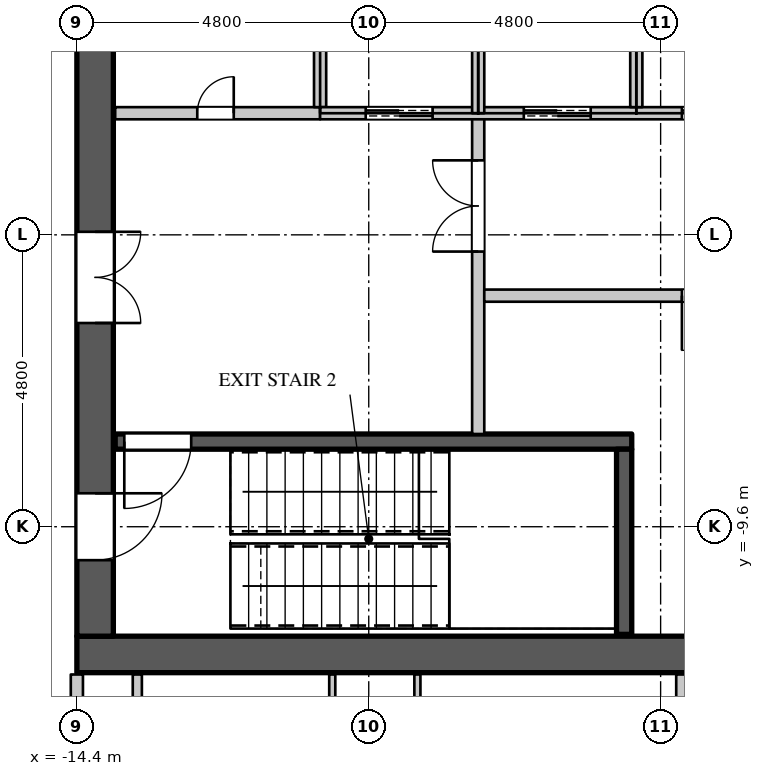
"""IFC4 building model, lengths in metres.
Left out: names, types, materials, properties, quantities, classifications, styles, units other than length and angle.
Written with IfcOpenShell. Run it as: python <this file> out.ifc"""

import sys

from ifc_helpers import new_model, si_unit, direction, frame, frame_2d, origin, place, context, subcontext, project, spatial, rectangle, extrude, element, fill, save


model = new_model("IFC4")
c1 = context("Model", 3, precision=1e-05, world=origin(), true_north=direction((0.0, 1.0)))
c2 = subcontext(c1, "Body", "Model", "MODEL_VIEW")
j1 = project(units=[si_unit("LENGTHUNIT", "METRE"), si_unit("PLANEANGLEUNIT", "RADIAN")], contexts=[c1])
p1 = place(None, origin())
s1 = spatial("IfcSite", under=j1, at=p1, CompositionType="ELEMENT")
p2 = place(p1, origin())
s2 = spatial("IfcBuilding", under=s1, at=p2, CompositionType="ELEMENT")
p3 = place(p2, frame((0.0, 0.0, 281.1)))
s3 = spatial("IfcBuildingStorey", under=s2, at=p3, CompositionType="ELEMENT", Elevation=281.1)
p4 = place(p3, frame((-14.4, -11.7, 0.0), z_axis=(0.0, 0.0, 1.0), x_axis=(1.0, 0.0, 0.0)))
e1 = element("IfcWall", 1, at=p4, inside=s3, PredefinedType="SHEAR", context=c2, shape_type="SweptSolid", body=[
    extrude(rectangle(XDim=28.8, YDim=0.6, at=frame_2d((14.4, 0.0))), origin(), (0.0, 0.0, 1.0), 4.2),
])
p5 = place(p3, frame((-14.1, -11.4, 0.0), z_axis=(0.0, 0.0, 1.0), x_axis=(0.0, 1.0, 0.0)))
e2 = element("IfcWall", 2, at=p5, inside=s3, PredefinedType="SHEAR", context=c2, shape_type="SweptSolid", body=[
    extrude(rectangle(XDim=22.8, YDim=0.6, at=frame_2d((11.4, 0.0))), origin(), (0.0, 0.0, 1.0), 4.2),
])
p6 = place(p5, frame((20.45, 0.0, 0.0)))
e3 = element("IfcOpeningElement", 3, at=p6, cuts=e2, PredefinedType="OPENING", context=c2, shape_type="SweptSolid", body=[
    extrude(rectangle(XDim=1.1, YDim=2.2, at=frame_2d((0.55, 1.1))), frame((0.0, 0.31, 0.0), z_axis=(0.0, -1.0, 0.0), x_axis=(1.0, 0.0, 0.0)), (0.0, 0.0, 1.0), 0.62),
])
p7 = place(p5, frame((1.25, 0.0, 0.0)))
e4 = element("IfcOpeningElement", 4, at=p7, cuts=e2, PredefinedType="OPENING", context=c2, shape_type="SweptSolid", body=[
    extrude(rectangle(XDim=1.1, YDim=2.2, at=frame_2d((0.55, 1.1))), frame((0.0, 0.31, 0.0), z_axis=(0.0, -1.0, 0.0), x_axis=(1.0, 0.0, 0.0)), (0.0, 0.0, 1.0), 0.62),
])
p8 = place(p5, frame((16.15, 0.0, 0.0)))
e5 = element("IfcOpeningElement", 5, at=p8, cuts=e2, PredefinedType="OPENING", context=c2, shape_type="SweptSolid", body=[
    extrude(rectangle(XDim=1.5, YDim=2.4, at=frame_2d((0.75, 1.2))), frame((0.0, 0.31, 0.0), z_axis=(0.0, -1.0, 0.0), x_axis=(1.0, 0.0, 0.0)), (0.0, 0.0, 1.0), 0.62),
])
p9 = place(p5, frame((5.15, 0.0, 0.0)))
e6 = element("IfcOpeningElement", 6, at=p9, cuts=e2, PredefinedType="OPENING", context=c2, shape_type="SweptSolid", body=[
    extrude(rectangle(XDim=1.5, YDim=2.4, at=frame_2d((0.75, 1.2))), frame((0.0, 0.31, 0.0), z_axis=(0.0, -1.0, 0.0), x_axis=(1.0, 0.0, 0.0)), (0.0, 0.0, 1.0), 0.62),
])
p10 = place(p3, frame((-14.4, -14.3, 0.0), z_axis=(0.0, 0.0, 1.0), x_axis=(0.0, 1.0, 0.0)))
e7 = element("IfcWall", 7, at=p10, inside=s3, PredefinedType="PARTITIONING", context=c2, shape_type="SweptSolid", body=[
    extrude(rectangle(XDim=2.27, YDim=0.2, at=frame_2d((1.135, 0.0))), origin(), (0.0, 0.0, 1.0), 3.95),
])
p11 = place(p3, frame((-7.8, -8.075, 0.0), z_axis=(0.0, 0.0, 1.0), x_axis=(0.0, 1.0, 0.0)))
e8 = element("IfcWall", 8, at=p11, inside=s3, PredefinedType="PARTITIONING", context=c2, shape_type="SweptSolid", body=[
    extrude(rectangle(XDim=5.275, YDim=0.2, at=frame_2d((2.637, 0.0))), origin(), (0.0, 0.0, 1.0), 3.95),
])
p12 = place(p11, frame((3.0, 0.0, 0.0)))
e9 = element("IfcOpeningElement", 9, at=p12, cuts=e8, PredefinedType="OPENING", context=c2, shape_type="SweptSolid", body=[
    extrude(rectangle(XDim=1.5, YDim=2.4, at=frame_2d((0.75, 1.2))), frame((0.0, 0.11, 0.0), z_axis=(0.0, -1.0, 0.0), x_axis=(1.0, 0.0, 0.0)), (0.0, 0.0, 1.0), 0.22),
])
p13 = place(p3, frame((-7.7, -5.8, 0.0), z_axis=(0.0, 0.0, 1.0), x_axis=(1.0, 0.0, 0.0)))
e10 = element("IfcWall", 10, at=p13, inside=s3, PredefinedType="PARTITIONING", context=c2, shape_type="SweptSolid", body=[
    extrude(rectangle(XDim=21.47, YDim=0.2, at=frame_2d((10.735, 0.0))), origin(), (0.0, 0.0, 1.0), 3.95),
])
p14 = place(p13, frame((3.25, 0.0, 0.0)))
e11 = element("IfcOpeningElement", 11, at=p14, cuts=e10, PredefinedType="OPENING", context=c2, shape_type="SweptSolid", body=[
    extrude(rectangle(XDim=0.9, YDim=2.2, at=frame_2d((0.45, 1.1))), frame((0.0, 0.11, 0.0), z_axis=(0.0, -1.0, 0.0), x_axis=(1.0, 0.0, 0.0)), (0.0, 0.0, 1.0), 0.22),
])
p15 = place(p13, frame((11.3, 0.0, 0.0)))
e12 = element("IfcOpeningElement", 12, at=p15, cuts=e10, PredefinedType="OPENING", context=c2, shape_type="SweptSolid", body=[
    extrude(rectangle(XDim=0.9, YDim=2.2, at=frame_2d((0.45, 1.1))), frame((0.0, 0.11, 0.0), z_axis=(0.0, -1.0, 0.0), x_axis=(1.0, 0.0, 0.0)), (0.0, 0.0, 1.0), 0.22),
])
p16 = place(p13, frame((18.35, 0.0, 0.0)))
e13 = element("IfcOpeningElement", 13, at=p16, cuts=e10, PredefinedType="OPENING", context=c2, shape_type="SweptSolid", body=[
    extrude(rectangle(XDim=0.9, YDim=2.2, at=frame_2d((0.45, 1.1))), frame((0.0, 0.11, 0.0), z_axis=(0.0, -1.0, 0.0), x_axis=(1.0, 0.0, 0.0)), (0.0, 0.0, 1.0), 0.22),
])
p17 = place(p3, frame((-13.406, -25.731, 0.0), z_axis=(0.0, 0.0, 1.0), x_axis=(0.0, 1.0, 0.0)))
e14 = element("IfcWall", 14, at=p17, inside=s3, PredefinedType="PARTITIONING", context=c2, shape_type="SweptSolid", body=[
    extrude(rectangle(XDim=13.701, YDim=0.15, at=frame_2d((6.851, 0.0))), origin(), (0.0, 0.0, 1.0), 3.3),
])
p18 = place(p17, frame((9.7, 0.0, 0.0)))
e15 = element("IfcOpeningElement", 15, at=p18, cuts=e14, PredefinedType="OPENING", context=c2, shape_type="SweptSolid", body=[
    extrude(rectangle(XDim=1.5, YDim=2.2, at=frame_2d((0.75, 1.1))), frame((0.0, 0.085, 0.0), z_axis=(0.0, -1.0, 0.0), x_axis=(1.0, 0.0, 0.0)), (0.0, 0.0, 1.0), 0.17),
])
p19 = place(p3, frame((-4.469, -25.95, 0.0), z_axis=(0.0, 0.0, 1.0), x_axis=(0.0, 1.0, 0.0)))
e16 = element("IfcWall", 16, at=p19, inside=s3, PredefinedType="PARTITIONING", context=c2, shape_type="SweptSolid", body=[
    extrude(rectangle(XDim=13.92, YDim=0.15, at=frame_2d((6.96, 0.0))), origin(), (0.0, 0.0, 1.0), 3.3),
])
p20 = place(p19, frame((3.4, 0.0, 0.0)))
e17 = element("IfcOpeningElement", 17, at=p20, cuts=e16, PredefinedType="OPENING", context=c2, shape_type="SweptSolid", body=[
    extrude(rectangle(XDim=0.95, YDim=2.2, at=frame_2d((0.475, 1.1))), frame((0.0, 0.085, 0.0), z_axis=(0.0, -1.0, 0.0), x_axis=(1.0, 0.0, 0.0)), (0.0, 0.0, 1.0), 0.17),
])
p21 = place(p3, frame((-13.77, -2.8, 0.0), z_axis=(0.0, 0.0, 1.0), x_axis=(1.0, 0.0, 0.0)))
e18 = element("IfcWall", 18, at=p21, inside=s3, PredefinedType="PARTITIONING", context=c2, shape_type="SweptSolid", body=[
    extrude(rectangle(XDim=3.37, YDim=0.2, at=frame_2d((1.685, 0.0))), origin(), (0.0, 0.0, 1.0), 3.95),
])
p22 = place(p21, frame((1.35, 0.0, 0.0)))
e19 = element("IfcOpeningElement", 19, at=p22, cuts=e18, PredefinedType="OPENING", context=c2, shape_type="SweptSolid", body=[
    extrude(rectangle(XDim=0.6, YDim=2.0, at=frame_2d((0.3, 1.0))), frame((0.0, 0.11, 0.0), z_axis=(0.0, -1.0, 0.0), x_axis=(1.0, 0.0, 0.0)), (0.0, 0.0, 1.0), 0.22),
])
p23 = place(p3, frame((-10.4, -2.7, 0.0), z_axis=(0.0, 0.0, 1.0), x_axis=(0.0, 1.0, 0.0)))
e20 = element("IfcWall", 20, at=p23, inside=s3, PredefinedType="PARTITIONING", context=c2, shape_type="SweptSolid", body=[
    extrude(rectangle(XDim=2.7, YDim=0.2, at=frame_2d((1.35, 0.0))), origin(), (0.0, 0.0, 1.0), 3.95),
])
p24 = place(p3, frame((-10.4, -2.8, 0.0), z_axis=(0.0, 0.0, 1.0), x_axis=(1.0, 0.0, 0.0)))
e21 = element("IfcWall", 21, at=p24, inside=s3, PredefinedType="PARTITIONING", context=c2, shape_type="SweptSolid", body=[
    extrude(rectangle(XDim=18.2, YDim=0.2, at=frame_2d((9.1, 0.0))), origin(), (0.0, 0.0, 1.0), 3.95),
])
p25 = place(p24, frame((0.75, 0.0, 0.0)))
e22 = element("IfcOpeningElement", 22, at=p25, cuts=e21, PredefinedType="OPENING", context=c2, shape_type="SweptSolid", body=[
    extrude(rectangle(XDim=1.1, YDim=2.2, at=frame_2d((0.55, 1.1))), frame((0.0, 0.11, 0.0), z_axis=(0.0, -1.0, 0.0), x_axis=(1.0, 0.0, 0.0)), (0.0, 0.0, 1.0), 0.22),
])
p26 = place(p24, frame((3.35, 0.0, 0.0)))
e23 = element("IfcOpeningElement", 23, at=p26, cuts=e21, PredefinedType="OPENING", context=c2, shape_type="SweptSolid", body=[
    extrude(rectangle(XDim=1.1, YDim=2.2, at=frame_2d((0.55, 1.1))), frame((0.0, 0.11, 0.0), z_axis=(0.0, -1.0, 0.0), x_axis=(1.0, 0.0, 0.0)), (0.0, 0.0, 1.0), 0.22),
])
p27 = place(p24, frame((5.95, 0.0, 0.0)))
e24 = element("IfcOpeningElement", 24, at=p27, cuts=e21, PredefinedType="OPENING", context=c2, shape_type="SweptSolid", body=[
    extrude(rectangle(XDim=1.1, YDim=2.2, at=frame_2d((0.55, 1.1))), frame((0.0, 0.11, 0.0), z_axis=(0.0, -1.0, 0.0), x_axis=(1.0, 0.0, 0.0)), (0.0, 0.0, 1.0), 0.22),
])
p28 = place(p24, frame((8.55, 0.0, 0.0)))
e25 = element("IfcOpeningElement", 25, at=p28, cuts=e21, PredefinedType="OPENING", context=c2, shape_type="SweptSolid", body=[
    extrude(rectangle(XDim=1.1, YDim=2.2, at=frame_2d((0.55, 1.1))), frame((0.0, 0.11, 0.0), z_axis=(0.0, -1.0, 0.0), x_axis=(1.0, 0.0, 0.0)), (0.0, 0.0, 1.0), 0.22),
])
p29 = place(p24, frame((11.15, 0.0, 0.0)))
e26 = element("IfcOpeningElement", 26, at=p29, cuts=e21, PredefinedType="OPENING", context=c2, shape_type="SweptSolid", body=[
    extrude(rectangle(XDim=1.1, YDim=2.2, at=frame_2d((0.55, 1.1))), frame((0.0, 0.11, 0.0), z_axis=(0.0, -1.0, 0.0), x_axis=(1.0, 0.0, 0.0)), (0.0, 0.0, 1.0), 0.22),
])
p30 = place(p24, frame((13.75, 0.0, 0.0)))
e27 = element("IfcOpeningElement", 27, at=p30, cuts=e21, PredefinedType="OPENING", context=c2, shape_type="SweptSolid", body=[
    extrude(rectangle(XDim=1.1, YDim=2.2, at=frame_2d((0.55, 1.1))), frame((0.0, 0.11, 0.0), z_axis=(0.0, -1.0, 0.0), x_axis=(1.0, 0.0, 0.0)), (0.0, 0.0, 1.0), 0.22),
])
p31 = place(p24, frame((16.35, 0.0, 0.0)))
e28 = element("IfcOpeningElement", 28, at=p31, cuts=e21, PredefinedType="OPENING", context=c2, shape_type="SweptSolid", body=[
    extrude(rectangle(XDim=1.1, YDim=2.2, at=frame_2d((0.55, 1.1))), frame((0.0, 0.11, 0.0), z_axis=(0.0, -1.0, 0.0), x_axis=(1.0, 0.0, 0.0)), (0.0, 0.0, 1.0), 0.22),
])
p32 = place(p3, frame((-7.8, -2.8, 0.0), z_axis=(0.0, 0.0, 1.0), x_axis=(0.0, 1.0, 0.0)))
e29 = element("IfcWall", 29, at=p32, inside=s3, PredefinedType="PARTITIONING", context=c2, shape_type="SweptSolid", body=[
    extrude(rectangle(XDim=2.8, YDim=0.2, at=frame_2d((1.4, 0.0))), origin(), (0.0, 0.0, 1.0), 3.95),
])
p33 = place(p3, frame((-5.2, -2.7, 0.0), z_axis=(0.0, 0.0, 1.0), x_axis=(0.0, 1.0, 0.0)))
e30 = element("IfcWall", 30, at=p33, inside=s3, PredefinedType="PARTITIONING", context=c2, shape_type="SweptSolid", body=[
    extrude(rectangle(XDim=2.6, YDim=0.2, at=frame_2d((1.3, 0.0))), origin(), (0.0, 0.0, 1.0), 3.95),
])
p34 = place(p3, frame((-13.77, -8.2, 0.0), z_axis=(0.0, 0.0, 1.0), x_axis=(1.0, 0.0, 0.0)))
e31 = element("IfcWall", 31, at=p34, inside=s3, PredefinedType="SHEAR", context=c2, shape_type="SweptSolid", body=[
    extrude(rectangle(XDim=8.495, YDim=0.25, at=frame_2d((4.248, 0.0))), origin(), (0.0, 0.0, 1.0), 3.95),
])
p35 = place(p34, frame((0.15, 0.0, 0.0)))
e32 = element("IfcOpeningElement", 32, at=p35, cuts=e31, PredefinedType="OPENING", context=c2, shape_type="SweptSolid", body=[
    extrude(rectangle(XDim=1.1, YDim=2.2, at=frame_2d((0.55, 1.1))), frame((0.0, 0.135, 0.0), z_axis=(0.0, -1.0, 0.0), x_axis=(1.0, 0.0, 0.0)), (0.0, 0.0, 1.0), 0.27),
])
p36 = place(p3, frame((-5.4, -11.37, 0.0), z_axis=(0.0, 0.0, 1.0), x_axis=(0.0, 1.0, 0.0)))
e33 = element("IfcWall", 33, at=p36, inside=s3, PredefinedType="SHEAR", context=c2, shape_type="SweptSolid", body=[
    extrude(rectangle(XDim=3.045, YDim=0.25, at=frame_2d((1.522, 0.0))), origin(), (0.0, 0.0, 1.0), 3.95),
])
p37 = place(p3, frame((-10.2, -17.275, 0.0), z_axis=(0.0, 0.0, 1.0), x_axis=(0.0, 1.0, 0.0)))
e34 = element("IfcWall", 34, at=p37, inside=s3, PredefinedType="PARTITIONING", context=c2, shape_type="SweptSolid", body=[
    extrude(rectangle(XDim=5.245, YDim=0.1, at=frame_2d((2.623, 0.0))), origin(), (0.0, 0.0, 1.0), 3.95),
])
p38 = place(p37, frame((2.15, 0.0, 0.0)))
e35 = element("IfcOpeningElement", 35, at=p38, cuts=e34, PredefinedType="OPENING", context=c2, shape_type="SweptSolid", body=[
    extrude(rectangle(XDim=0.9, YDim=2.2, at=frame_2d((0.45, 1.1))), frame((0.0, 0.06, 0.0), z_axis=(0.0, -1.0, 0.0), x_axis=(1.0, 0.0, 0.0)), (0.0, 0.0, 1.0), 0.12),
])
p39 = place(p3, frame((-8.8, -18.225, 0.0), z_axis=(0.0, 0.0, 1.0), x_axis=(0.0, 1.0, 0.0)))
e36 = element("IfcWall", 36, at=p39, inside=s3, PredefinedType="PARTITIONING", context=c2, shape_type="SweptSolid", body=[
    extrude(rectangle(XDim=6.195, YDim=0.1, at=frame_2d((3.098, 0.0))), origin(), (0.0, 0.0, 1.0), 3.95),
])
p40 = place(p22, origin())
e37 = element("IfcDoor", 37, at=p40, inside=s3, OperationType="SINGLE_SWING_RIGHT", PredefinedType="DOOR", context=c2, shape_type="SweptSolid", body=[
    extrude(rectangle(XDim=0.6, YDim=2.0, at=frame_2d((0.3, 1.0))), frame((0.0, 0.025, 0.0), z_axis=(0.0, -1.0, 0.0), x_axis=(1.0, 0.0, 0.0)), (0.0, 0.0, 1.0), 0.05),
])
fill(e19, e37)
p41 = place(p14, origin())
e38 = element("IfcDoor", 38, at=p41, inside=s3, OperationType="SINGLE_SWING_RIGHT", PredefinedType="DOOR", context=c2, shape_type="SweptSolid", body=[
    extrude(rectangle(XDim=0.9, YDim=2.2, at=frame_2d((0.45, 1.1))), frame((0.0, 0.025, 0.0), z_axis=(0.0, -1.0, 0.0), x_axis=(1.0, 0.0, 0.0)), (0.0, 0.0, 1.0), 0.05),
])
fill(e11, e38)
p42 = place(p25, origin())
e39 = element("IfcDoor", 39, at=p42, inside=s3, OperationType="DOUBLE_DOOR_SLIDING", PredefinedType="DOOR", context=c2, shape_type="SweptSolid", body=[
    extrude(rectangle(XDim=1.1, YDim=2.2, at=frame_2d((0.55, 1.1))), frame((0.0, 0.025, 0.0), z_axis=(0.0, -1.0, 0.0), x_axis=(1.0, 0.0, 0.0)), (0.0, 0.0, 1.0), 0.05),
])
fill(e22, e39)
p43 = place(p26, origin())
e40 = element("IfcDoor", 40, at=p43, inside=s3, OperationType="DOUBLE_DOOR_SLIDING", PredefinedType="DOOR", context=c2, shape_type="SweptSolid", body=[
    extrude(rectangle(XDim=1.1, YDim=2.2, at=frame_2d((0.55, 1.1))), frame((0.0, 0.025, 0.0), z_axis=(0.0, -1.0, 0.0), x_axis=(1.0, 0.0, 0.0)), (0.0, 0.0, 1.0), 0.05),
])
fill(e23, e40)
p44 = place(p27, origin())
e41 = element("IfcDoor", 41, at=p44, inside=s3, OperationType="DOUBLE_DOOR_SLIDING", PredefinedType="DOOR", context=c2, shape_type="SweptSolid", body=[
    extrude(rectangle(XDim=1.1, YDim=2.2, at=frame_2d((0.55, 1.1))), frame((0.0, 0.025, 0.0), z_axis=(0.0, -1.0, 0.0), x_axis=(1.0, 0.0, 0.0)), (0.0, 0.0, 1.0), 0.05),
])
fill(e24, e41)
p45 = place(p35, origin())
e42 = element("IfcDoor", 42, at=p45, inside=s3, OperationType="SINGLE_SWING_RIGHT", PredefinedType="DOOR", context=c2, shape_type="SweptSolid", body=[
    extrude(rectangle(XDim=1.1, YDim=2.2, at=frame_2d((0.55, 1.1))), frame((0.0, 0.025, 0.0), z_axis=(0.0, -1.0, 0.0), x_axis=(1.0, 0.0, 0.0)), (0.0, 0.0, 1.0), 0.05),
])
fill(e32, e42)
p46 = place(p12, origin())
e43 = element("IfcDoor", 43, at=p46, inside=s3, OperationType="DOUBLE_DOOR_SINGLE_SWING", PredefinedType="DOOR", context=c2, shape_type="SweptSolid", body=[
    extrude(rectangle(XDim=1.5, YDim=2.4, at=frame_2d((0.75, 1.2))), frame((0.0, 0.025, 0.0), z_axis=(0.0, -1.0, 0.0), x_axis=(1.0, 0.0, 0.0)), (0.0, 0.0, 1.0), 0.05),
])
fill(e9, e43)
p47 = place(p7, origin())
e44 = element("IfcDoor", 44, at=p47, inside=s3, OperationType="SINGLE_SWING_LEFT", PredefinedType="DOOR", context=c2, shape_type="SweptSolid", body=[
    extrude(rectangle(XDim=1.1, YDim=2.2, at=frame_2d((0.55, 1.1))), frame((0.0, -0.245, 0.0), z_axis=(0.0, -1.0, 0.0), x_axis=(1.0, 0.0, 0.0)), (0.0, 0.0, 1.0), 0.05),
])
fill(e4, e44)
p48 = place(p9, origin())
e45 = element("IfcDoor", 45, at=p48, inside=s3, OperationType="DOUBLE_DOOR_SINGLE_SWING", PredefinedType="DOOR", context=c2, shape_type="SweptSolid", body=[
    extrude(rectangle(XDim=1.5, YDim=2.4, at=frame_2d((0.75, 1.2))), frame((0.0, -0.245, 0.0), z_axis=(0.0, -1.0, 0.0), x_axis=(1.0, 0.0, 0.0)), (0.0, 0.0, 1.0), 0.05),
])
fill(e6, e45)
save(model, sys.argv[1])
